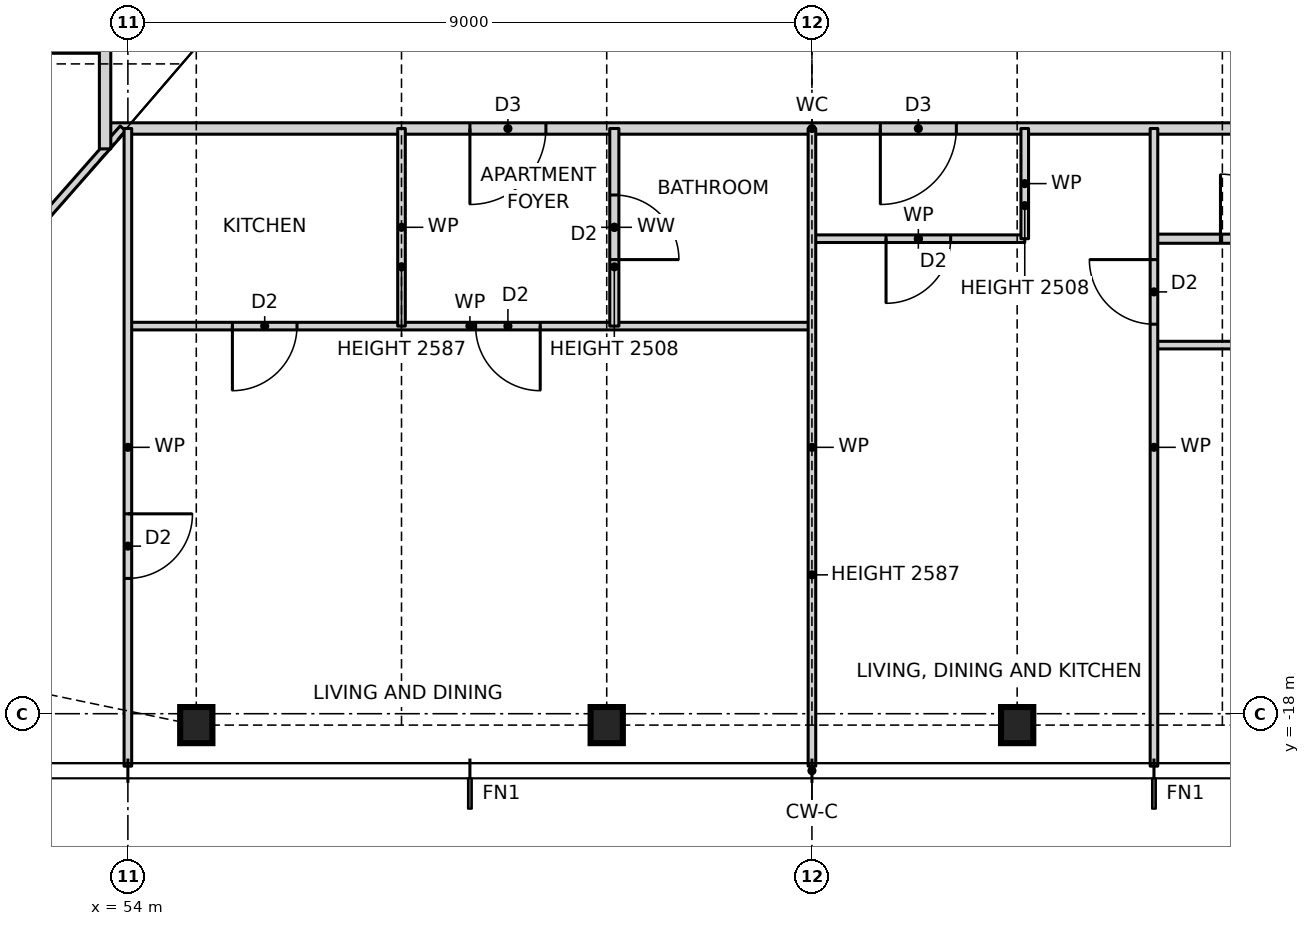
"""IFC4 building model, lengths in metres.
Left out: names, types, materials, properties, quantities, classifications, styles, units other than length and angle.
Written with IfcOpenShell. Run it as: python <this file> out.ifc"""

import sys

from ifc_helpers import new_model, si_unit, direction, frame, frame_2d, origin, origin_2d, place, context, subcontext, project, spatial, rectangle, i_section, extrude, element, fill, save


model = new_model("IFC4")
c1 = context("Model", 3, precision=1e-05, world=origin(), true_north=direction((0.0, 1.0)))
c2 = subcontext(c1, "Body", "Model", "MODEL_VIEW")
j1 = project(units=[si_unit("LENGTHUNIT", "METRE"), si_unit("PLANEANGLEUNIT", "RADIAN")], contexts=[c1])
p1 = place(None, origin())
s1 = spatial("IfcSite", under=j1, at=p1, CompositionType="ELEMENT")
p2 = place(p1, origin())
s2 = spatial("IfcBuilding", under=s1, at=p2, CompositionType="ELEMENT")
p3 = place(p2, frame((0.0, 0.0, 67.5)))
s3 = spatial("IfcBuildingStorey", under=s2, at=p3, CompositionType="ELEMENT", Elevation=67.5)
for number, where, z_axis, x_axis in (
    (1, (54.9, -18.15, 0.0), (0.0, 0.0, 1.0), (1.0, 0.0, 0.0)),
    (2, (60.3, -18.15, 0.0), (0.0, 0.0, 1.0), (1.0, 0.0, 0.0)),
    (3, (65.7, -18.15, 0.0), (0.0, 0.0, 1.0), (1.0, 0.0, 0.0)),
):
    element("IfcColumn", number, at=place(p3, frame(where, z_axis=z_axis, x_axis=x_axis)), inside=s3, PredefinedType="COLUMN", context=c2, shape_type="SweptSolid", body=[
        extrude(i_section(OverallWidth=0.424, OverallDepth=0.475, WebThickness=0.048, FlangeThickness=0.077, at=origin_2d()), origin(), (0.0, 0.0, 1.0), 3.5),
    ])
p4 = place(p3, frame((67.5, -13.15, 0.0), z_axis=(0.0, 0.0, 1.0), x_axis=(1.0, 0.0, 0.0)))
e4 = element("IfcWall", 4, at=p4, inside=s3, PredefinedType="PARTITIONING", context=c2, shape_type="SweptSolid", body=[
    extrude(rectangle(XDim=6.7, YDim=0.1, at=frame_2d((3.35, 0.0))), origin(), (0.0, 0.0, 1.0), 3.27),
])
p5 = place(p4, frame((1.825, 0.0, 0.0)))
e5 = element("IfcOpeningElement", 5, at=p5, cuts=e4, PredefinedType="OPENING", context=c2, shape_type="SweptSolid", body=[
    extrude(rectangle(XDim=0.85, YDim=2.1, at=frame_2d((0.425, 1.05))), frame((0.0, 0.06, 0.0), z_axis=(0.0, -1.0, 0.0), x_axis=(1.0, 0.0, 0.0)), (0.0, 0.0, 1.0), 0.12),
])
p6 = place(p4, frame((5.175, 0.0, 0.0)))
e6 = element("IfcOpeningElement", 6, at=p6, cuts=e4, PredefinedType="OPENING", context=c2, shape_type="SweptSolid", body=[
    extrude(rectangle(XDim=0.85, YDim=2.1, at=frame_2d((0.425, 1.05))), frame((0.0, 0.06, 0.0), z_axis=(0.0, -1.0, 0.0), x_axis=(1.0, 0.0, 0.0)), (0.0, 0.0, 1.0), 0.12),
])
p7 = place(p3, frame((54.0, -12.9, 0.0), z_axis=(0.0, 0.0, 1.0), x_axis=(1.0, 0.0, 0.0)))
e7 = element("IfcWall", 7, at=p7, inside=s3, PredefinedType="PARTITIONING", context=c2, shape_type="SweptSolid", body=[
    extrude(rectangle(XDim=9.0, YDim=0.1, at=frame_2d((4.5, 0.0))), origin(), (0.0, 0.0, 1.0), 3.27),
])
p8 = place(p7, frame((1.375, 0.0, 0.0)))
e8 = element("IfcOpeningElement", 8, at=p8, cuts=e7, PredefinedType="OPENING", context=c2, shape_type="SweptSolid", body=[
    extrude(rectangle(XDim=0.85, YDim=2.1, at=frame_2d((0.425, 1.05))), frame((0.0, 0.06, 0.0), z_axis=(0.0, -1.0, 0.0), x_axis=(1.0, 0.0, 0.0)), (0.0, 0.0, 1.0), 0.12),
])
p9 = place(p7, frame((4.575, 0.0, 0.0)))
e9 = element("IfcOpeningElement", 9, at=p9, cuts=e7, PredefinedType="OPENING", context=c2, shape_type="SweptSolid", body=[
    extrude(rectangle(XDim=0.85, YDim=2.1, at=frame_2d((0.425, 1.05))), frame((0.0, 0.06, 0.0), z_axis=(0.0, -1.0, 0.0), x_axis=(1.0, 0.0, 0.0)), (0.0, 0.0, 1.0), 0.12),
])
p10 = place(p3, frame((63.0, -11.75, 0.0), z_axis=(0.0, 0.0, 1.0), x_axis=(1.0, 0.0, 0.0)))
e10 = element("IfcWall", 10, at=p10, inside=s3, PredefinedType="PARTITIONING", context=c2, shape_type="SweptSolid", body=[
    extrude(rectangle(XDim=2.8, YDim=0.1, at=frame_2d((1.4, 0.0))), origin(), (0.0, 0.0, 1.0), 3.27),
])
p11 = place(p10, frame((0.975, 0.0, 0.0)))
e11 = element("IfcOpeningElement", 11, at=p11, cuts=e10, PredefinedType="OPENING", context=c2, shape_type="SweptSolid", body=[
    extrude(rectangle(XDim=0.85, YDim=2.1, at=frame_2d((0.425, 1.05))), frame((0.0, 0.06, 0.0), z_axis=(0.0, -1.0, 0.0), x_axis=(1.0, 0.0, 0.0)), (0.0, 0.0, 1.0), 0.12),
])
p12 = place(p3, frame((67.5, -11.75, 0.0), z_axis=(0.0, 0.0, 1.0), x_axis=(1.0, 0.0, 0.0)))
e12 = element("IfcWall", 12, at=p12, inside=s3, PredefinedType="PARTITIONING", context=c2, shape_type="SweptSolid", body=[
    extrude(rectangle(XDim=5.84, YDim=0.12, at=frame_2d((2.92, 0.0))), origin(), (0.0, 0.0, 1.0), 3.27),
])
p13 = place(p12, frame((0.875, 0.0, 0.0)))
e13 = element("IfcOpeningElement", 13, at=p13, cuts=e12, PredefinedType="OPENING", context=c2, shape_type="SweptSolid", body=[
    extrude(rectangle(XDim=0.85, YDim=2.1, at=frame_2d((0.425, 1.05))), frame((0.0, 0.07, 0.0), z_axis=(0.0, -1.0, 0.0), x_axis=(1.0, 0.0, 0.0)), (0.0, 0.0, 1.0), 0.14),
])
p14 = place(p12, frame((3.795, 0.0, 0.0)))
e14 = element("IfcOpeningElement", 14, at=p14, cuts=e12, PredefinedType="OPENING", context=c2, shape_type="SweptSolid", body=[
    extrude(rectangle(XDim=0.85, YDim=2.1, at=frame_2d((0.425, 1.05))), frame((0.0, 0.07, 0.0), z_axis=(0.0, -1.0, 0.0), x_axis=(1.0, 0.0, 0.0)), (0.0, 0.0, 1.0), 0.14),
])
p15 = place(p3, frame((53.7, -10.3, 0.0), z_axis=(0.0, 0.0, 1.0), x_axis=(1.0, 0.0, 0.0)))
e15 = element("IfcWall", 15, at=p15, inside=s3, PredefinedType="PARTITIONING", context=c2, shape_type="SweptSolid", body=[
    extrude(rectangle(XDim=18.6, YDim=0.15, at=frame_2d((9.3, 0.0))), origin(), (0.0, 0.0, 1.0), 3.27),
])
p16 = place(p15, frame((4.8, 0.0, 0.0)))
e16 = element("IfcOpeningElement", 16, at=p16, cuts=e15, PredefinedType="OPENING", context=c2, shape_type="SweptSolid", body=[
    extrude(rectangle(XDim=1.0, YDim=2.1, at=frame_2d((0.5, 1.05))), frame((0.0, 0.085, 0.0), z_axis=(0.0, -1.0, 0.0), x_axis=(1.0, 0.0, 0.0)), (0.0, 0.0, 1.0), 0.17),
])
p17 = place(p15, frame((10.2, 0.0, 0.0)))
e17 = element("IfcOpeningElement", 17, at=p17, cuts=e15, PredefinedType="OPENING", context=c2, shape_type="SweptSolid", body=[
    extrude(rectangle(XDim=1.0, YDim=2.1, at=frame_2d((0.5, 1.05))), frame((0.0, 0.085, 0.0), z_axis=(0.0, -1.0, 0.0), x_axis=(1.0, 0.0, 0.0)), (0.0, 0.0, 1.0), 0.17),
])
p18 = place(p3, frame((51.9, -9.25, 0.0), z_axis=(0.0, 0.0, 1.0), x_axis=(1.0, 0.0, 0.0)))
e18 = element("IfcWall", 18, at=p18, inside=s3, PredefinedType="PARTITIONING", context=c2, shape_type="SweptSolid", body=[
    extrude(rectangle(XDim=1.8, YDim=0.12, at=frame_2d((0.9, 0.0))), origin(), (0.0, 0.0, 1.0), 3.27),
])
p19 = place(p3, frame((47.944, -17.109, 0.0), z_axis=(0.0, 0.0, 1.0), x_axis=(0.660638210404, 0.750704439146, 0.0)))
e19 = element("IfcWall", 19, at=p19, inside=s3, PredefinedType="PARTITIONING", context=c2, shape_type="SweptSolid", body=[
    extrude(rectangle(XDim=9.07, YDim=0.1, at=frame_2d((4.535, 0.0))), origin(), (0.0, 0.0, 1.0), 2.429),
])
p20 = place(p3, frame((67.5, -18.69, 0.0), z_axis=(0.0, 0.0, 1.0), x_axis=(0.0, 1.0, 0.0)))
e20 = element("IfcWall", 20, at=p20, inside=s3, PredefinedType="PARTITIONING", context=c2, shape_type="SweptSolid", body=[
    extrude(rectangle(XDim=8.39, YDim=0.1, at=frame_2d((4.195, 0.0))), origin(), (0.0, 0.0, 1.0), 3.27),
])
p21 = place(p20, frame((5.815, 0.0, 0.0)))
e21 = element("IfcOpeningElement", 21, at=p21, cuts=e20, PredefinedType="OPENING", context=c2, shape_type="SweptSolid", body=[
    extrude(rectangle(XDim=0.85, YDim=2.1, at=frame_2d((0.425, 1.05))), frame((0.0, 0.06, 0.0), z_axis=(0.0, -1.0, 0.0), x_axis=(1.0, 0.0, 0.0)), (0.0, 0.0, 1.0), 0.12),
])
p22 = place(p3, frame((65.8, -11.75, 0.0), z_axis=(0.0, 0.0, 1.0), x_axis=(0.0, 1.0, 0.0)))
e22 = element("IfcWall", 22, at=p22, inside=s3, PredefinedType="PARTITIONING", context=c2, shape_type="SweptSolid", body=[
    extrude(rectangle(XDim=1.45, YDim=0.1, at=frame_2d((0.725, 0.0))), origin(), (0.0, 0.0, 1.0), 2.508),
])
p23 = place(p3, frame((63.0, -18.69, 0.0), z_axis=(0.0, 0.0, 1.0), x_axis=(0.0, 1.0, 0.0)))
e23 = element("IfcWall", 23, at=p23, inside=s3, PredefinedType="PARTITIONING", context=c2, shape_type="SweptSolid", body=[
    extrude(rectangle(XDim=8.39, YDim=0.1, at=frame_2d((4.195, 0.0))), origin(), (0.0, 0.0, 1.0), 2.587),
])
p24 = place(p3, frame((60.4, -12.9, 0.0), z_axis=(0.0, 0.0, 1.0), x_axis=(0.0, 1.0, 0.0)))
e24 = element("IfcWall", 24, at=p24, inside=s3, PredefinedType="PARTITIONING", context=c2, shape_type="SweptSolid", body=[
    extrude(rectangle(XDim=2.6, YDim=0.12, at=frame_2d((1.3, 0.0))), origin(), (0.0, 0.0, 1.0), 2.508),
])
p25 = place(p24, frame((0.875, 0.0, 0.0)))
e25 = element("IfcOpeningElement", 25, at=p25, cuts=e24, PredefinedType="OPENING", context=c2, shape_type="SweptSolid", body=[
    extrude(rectangle(XDim=0.85, YDim=2.1, at=frame_2d((0.425, 1.05))), frame((0.0, 0.07, 0.0), z_axis=(0.0, -1.0, 0.0), x_axis=(1.0, 0.0, 0.0)), (0.0, 0.0, 1.0), 0.14),
])
p26 = place(p3, frame((57.6, -12.9, 0.0), z_axis=(0.0, 0.0, 1.0), x_axis=(0.0, 1.0, 0.0)))
e26 = element("IfcWall", 26, at=p26, inside=s3, PredefinedType="PARTITIONING", context=c2, shape_type="SweptSolid", body=[
    extrude(rectangle(XDim=2.6, YDim=0.1, at=frame_2d((1.3, 0.0))), origin(), (0.0, 0.0, 1.0), 2.587),
])
p27 = place(p3, frame((54.0, -18.69, 0.0), z_axis=(0.0, 0.0, 1.0), x_axis=(0.0, 1.0, 0.0)))
e27 = element("IfcWall", 27, at=p27, inside=s3, PredefinedType="PARTITIONING", context=c2, shape_type="SweptSolid", body=[
    extrude(rectangle(XDim=8.39, YDim=0.1, at=frame_2d((4.195, 0.0))), origin(), (0.0, 0.0, 1.0), 3.27),
])
p28 = place(p27, frame((2.47, 0.0, 0.0)))
e28 = element("IfcOpeningElement", 28, at=p28, cuts=e27, PredefinedType="OPENING", context=c2, shape_type="SweptSolid", body=[
    extrude(rectangle(XDim=0.85, YDim=2.1, at=frame_2d((0.425, 1.05))), frame((0.0, 0.06, 0.0), z_axis=(0.0, -1.0, 0.0), x_axis=(1.0, 0.0, 0.0)), (0.0, 0.0, 1.0), 0.12),
])
p29 = place(p3, frame((53.7, -10.568, 0.0), z_axis=(0.0, 0.0, 1.0), x_axis=(0.0, 1.0, 0.0)))
e29 = element("IfcWall", 29, at=p29, inside=s3, PredefinedType="PARTITIONING", context=c2, shape_type="SweptSolid", body=[
    extrude(rectangle(XDim=21.136, YDim=0.15, at=frame_2d((10.568, 0.0))), origin(), (0.0, 0.0, 1.0), 3.27),
])
p30 = place(p29, frame((16.318, 0.0, 0.0)))
e30 = element("IfcOpeningElement", 30, at=p30, cuts=e29, PredefinedType="OPENING", context=c2, shape_type="SweptSolid", body=[
    extrude(rectangle(XDim=1.0, YDim=2.1, at=frame_2d((0.5, 1.05))), frame((0.0, 0.085, 0.0), z_axis=(0.0, -1.0, 0.0), x_axis=(1.0, 0.0, 0.0)), (0.0, 0.0, 1.0), 0.17),
])
p31 = place(p29, frame((10.918, 0.0, 0.0)))
e31 = element("IfcOpeningElement", 31, at=p31, cuts=e29, PredefinedType="OPENING", context=c2, shape_type="SweptSolid", body=[
    extrude(rectangle(XDim=1.0, YDim=2.1, at=frame_2d((0.5, 1.05))), frame((0.0, 0.085, 0.0), z_axis=(0.0, -1.0, 0.0), x_axis=(1.0, 0.0, 0.0)), (0.0, 0.0, 1.0), 0.17),
])
p32 = place(p8, frame((0.85, 0.0, 0.0), z_axis=(0.0, 0.0, 1.0), x_axis=(-1.0, 0.0, 0.0)))
e32 = element("IfcDoor", 32, at=p32, inside=s3, OperationType="SINGLE_SWING_RIGHT", PredefinedType="DOOR", context=c2, shape_type="SweptSolid", body=[
    extrude(rectangle(XDim=0.85, YDim=2.1, at=frame_2d((0.425, 1.05))), frame((0.0, 0.025, 0.0), z_axis=(0.0, -1.0, 0.0), x_axis=(1.0, 0.0, 0.0)), (0.0, 0.0, 1.0), 0.05),
])
fill(e8, e32)
p33 = place(p16, frame((1.0, 0.0, 0.0), z_axis=(0.0, 0.0, 1.0), x_axis=(-1.0, 0.0, 0.0)))
e33 = element("IfcDoor", 33, at=p33, inside=s3, OperationType="SINGLE_SWING_RIGHT", PredefinedType="DOOR", context=c2, shape_type="SweptSolid", body=[
    extrude(rectangle(XDim=1.0, YDim=2.1, at=frame_2d((0.5, 1.05))), frame((0.0, 0.025, 0.0), z_axis=(0.0, -1.0, 0.0), x_axis=(1.0, 0.0, 0.0)), (0.0, 0.0, 1.0), 0.05),
])
fill(e16, e33)
p34 = place(p9, frame((0.85, 0.0, 0.0), z_axis=(0.0, 0.0, 1.0), x_axis=(-1.0, 0.0, 0.0)))
e34 = element("IfcDoor", 34, at=p34, inside=s3, OperationType="SINGLE_SWING_LEFT", PredefinedType="DOOR", context=c2, shape_type="SweptSolid", body=[
    extrude(rectangle(XDim=0.85, YDim=2.1, at=frame_2d((0.425, 1.05))), frame((0.0, 0.025, 0.0), z_axis=(0.0, -1.0, 0.0), x_axis=(1.0, 0.0, 0.0)), (0.0, 0.0, 1.0), 0.05),
])
fill(e9, e34)
p35 = place(p25, frame((0.85, 0.0, 0.0), z_axis=(0.0, 0.0, 1.0), x_axis=(-1.0, 0.0, 0.0)))
e35 = element("IfcDoor", 35, at=p35, inside=s3, OperationType="SINGLE_SWING_RIGHT", PredefinedType="DOOR", context=c2, shape_type="SweptSolid", body=[
    extrude(rectangle(XDim=0.85, YDim=2.1, at=frame_2d((0.425, 1.05))), frame((0.0, 0.025, 0.0), z_axis=(0.0, -1.0, 0.0), x_axis=(1.0, 0.0, 0.0)), (0.0, 0.0, 1.0), 0.05),
])
fill(e25, e35)
p36 = place(p28, frame((0.85, 0.0, 0.0), z_axis=(0.0, 0.0, 1.0), x_axis=(-1.0, 0.0, 0.0)))
e36 = element("IfcDoor", 36, at=p36, inside=s3, OperationType="SINGLE_SWING_LEFT", PredefinedType="DOOR", context=c2, shape_type="SweptSolid", body=[
    extrude(rectangle(XDim=0.85, YDim=2.1, at=frame_2d((0.425, 1.05))), frame((0.0, 0.025, 0.0), z_axis=(0.0, -1.0, 0.0), x_axis=(1.0, 0.0, 0.0)), (0.0, 0.0, 1.0), 0.05),
])
fill(e28, e36)
p37 = place(p17, frame((1.0, 0.0, 0.0), z_axis=(0.0, 0.0, 1.0), x_axis=(-1.0, 0.0, 0.0)))
e37 = element("IfcDoor", 37, at=p37, inside=s3, OperationType="SINGLE_SWING_RIGHT", PredefinedType="DOOR", context=c2, shape_type="SweptSolid", body=[
    extrude(rectangle(XDim=1.0, YDim=2.1, at=frame_2d((0.5, 1.05))), frame((0.0, 0.025, 0.0), z_axis=(0.0, -1.0, 0.0), x_axis=(1.0, 0.0, 0.0)), (0.0, 0.0, 1.0), 0.05),
])
fill(e17, e37)
p38 = place(p11, frame((0.85, 0.0, 0.0), z_axis=(0.0, 0.0, 1.0), x_axis=(-1.0, 0.0, 0.0)))
e38 = element("IfcDoor", 38, at=p38, inside=s3, OperationType="SINGLE_SWING_RIGHT", PredefinedType="DOOR", context=c2, shape_type="SweptSolid", body=[
    extrude(rectangle(XDim=0.85, YDim=2.1, at=frame_2d((0.425, 1.05))), frame((0.0, 0.025, 0.0), z_axis=(0.0, -1.0, 0.0), x_axis=(1.0, 0.0, 0.0)), (0.0, 0.0, 1.0), 0.05),
])
fill(e11, e38)
p39 = place(p21, origin())
e39 = element("IfcDoor", 39, at=p39, inside=s3, OperationType="SINGLE_SWING_RIGHT", PredefinedType="DOOR", context=c2, shape_type="SweptSolid", body=[
    extrude(rectangle(XDim=0.85, YDim=2.1, at=frame_2d((0.425, 1.05))), frame((0.0, 0.025, 0.0), z_axis=(0.0, -1.0, 0.0), x_axis=(1.0, 0.0, 0.0)), (0.0, 0.0, 1.0), 0.05),
])
fill(e21, e39)
p40 = place(p13, origin())
e40 = element("IfcDoor", 40, at=p40, inside=s3, OperationType="SINGLE_SWING_LEFT", PredefinedType="DOOR", context=c2, shape_type="SweptSolid", body=[
    extrude(rectangle(XDim=0.85, YDim=2.1, at=frame_2d((0.425, 1.05))), frame((0.0, 0.025, 0.0), z_axis=(0.0, -1.0, 0.0), x_axis=(1.0, 0.0, 0.0)), (0.0, 0.0, 1.0), 0.05),
])
fill(e13, e40)
save(model, sys.argv[1])
